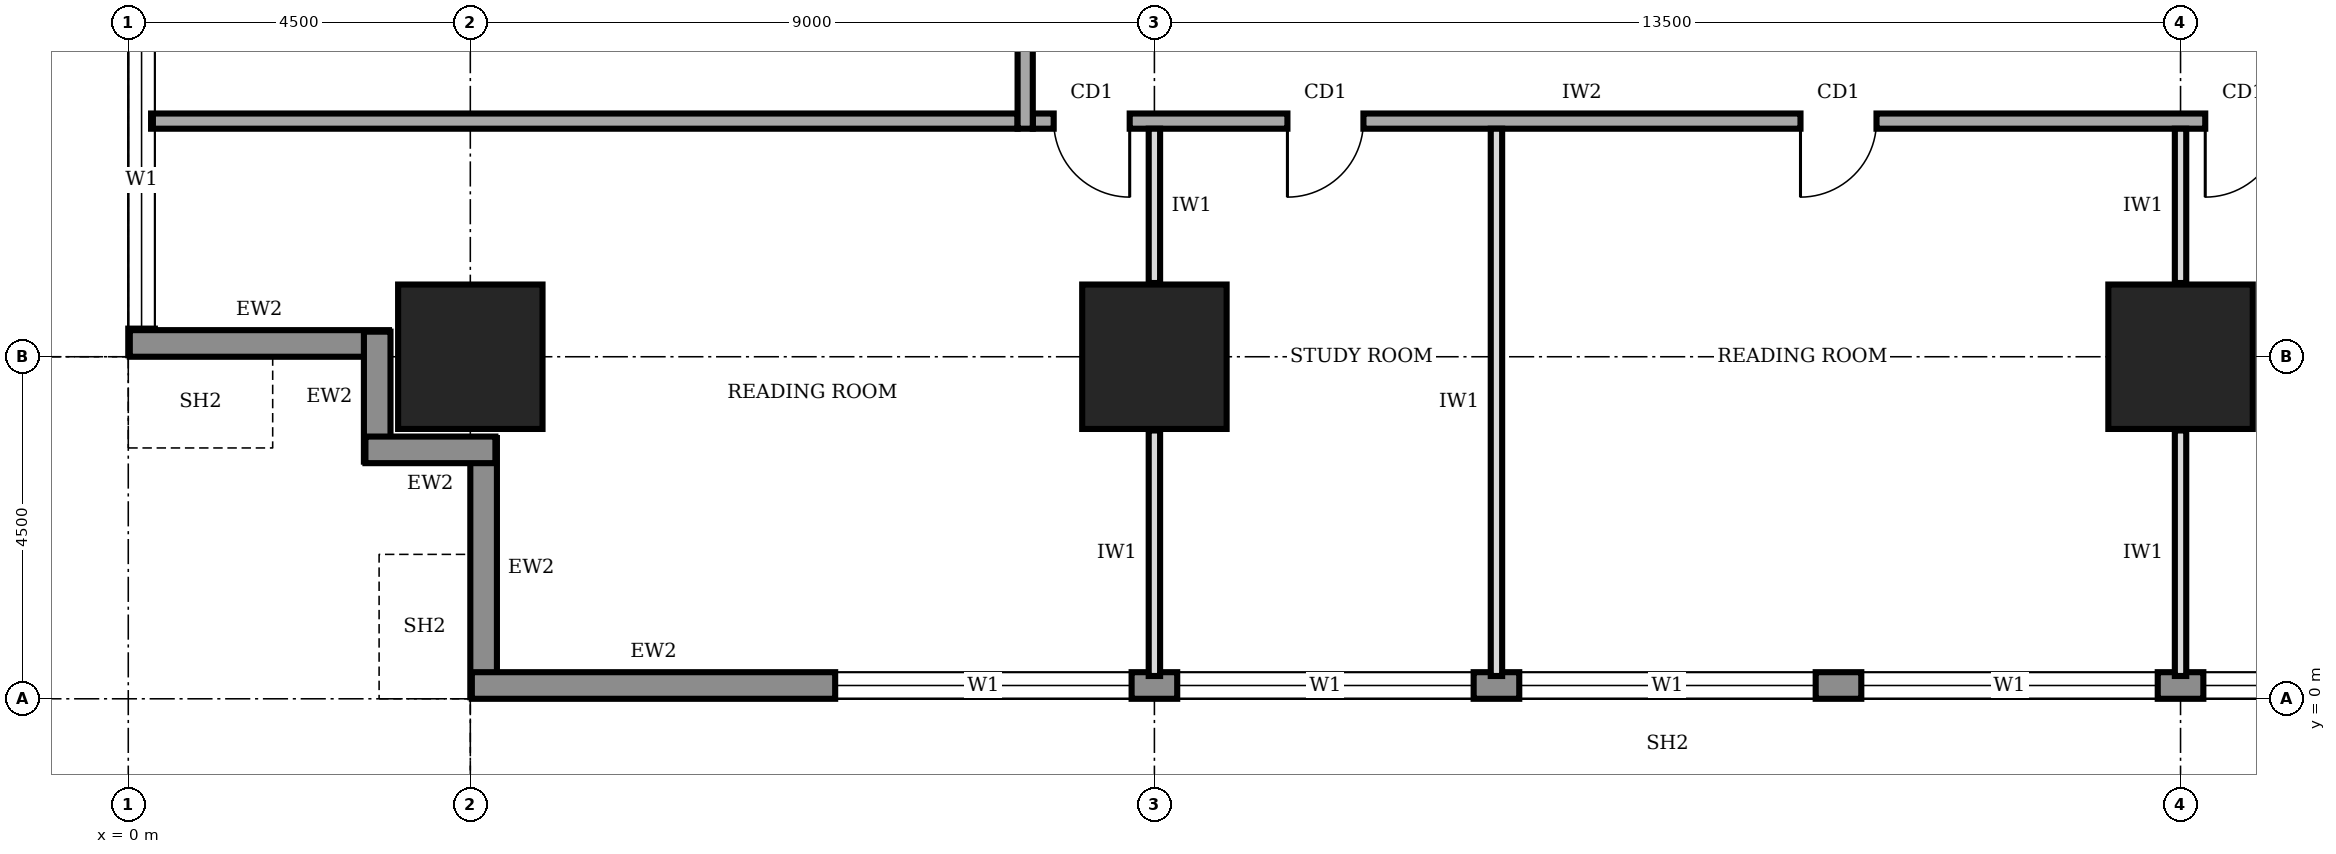
"""IFC4 building model, lengths in metres.
Left out: names, types, materials, properties, quantities, classifications, styles, units other than length and angle.
Written with IfcOpenShell. Run it as: python <this file> out.ifc"""

import sys

from ifc_helpers import new_model, si_unit, direction, frame, frame_2d, origin, origin_2d, place, context, subcontext, project, spatial, rectangle, extrude, element, fill, save


model = new_model("IFC4")
c1 = context("Model", 3, precision=1e-05, world=origin(), true_north=direction((0.0, 1.0)))
c2 = subcontext(c1, "Body", "Model", "MODEL_VIEW")
j1 = project(units=[si_unit("LENGTHUNIT", "METRE"), si_unit("PLANEANGLEUNIT", "RADIAN")], contexts=[c1])
p1 = place(None, origin())
s1 = spatial("IfcSite", under=j1, at=p1, CompositionType="ELEMENT")
p2 = place(p1, origin())
s2 = spatial("IfcBuilding", under=s1, at=p2, CompositionType="ELEMENT")
p3 = place(p2, frame((0.0, 0.0, 129.0)))
s3 = spatial("IfcBuildingStorey", under=s2, at=p3, CompositionType="ELEMENT", Elevation=129.0)
for number, where, z_axis, x_axis in (
    (1, (4.5, 4.5, 0.0), (0.0, 0.0, 1.0), (1.0, 0.0, 0.0)),
    (2, (13.5, 4.5, 0.0), (0.0, 0.0, 1.0), (1.0, 0.0, 0.0)),
    (3, (27.0, 4.5, 0.0), (0.0, 0.0, 1.0), (1.0, 0.0, 0.0)),
):
    element("IfcColumn", number, at=place(p3, frame(where, z_axis=z_axis, x_axis=x_axis)), inside=s3, PredefinedType="COLUMN", context=c2, shape_type="SweptSolid", body=[
        extrude(rectangle(XDim=1.9, YDim=1.9, at=origin_2d()), origin(), (0.0, 0.0, 1.0), 4.0),
    ])
p4 = place(p3, frame((4.675, 3.43, 0.0), z_axis=(0.0, 0.0, 1.0), x_axis=(0.0, -1.0, 0.0)))
e4 = element("IfcWall", 4, at=p4, inside=s3, PredefinedType="STANDARD", context=c2, shape_type="SweptSolid", body=[
    extrude(rectangle(XDim=3.41, YDim=0.35, at=frame_2d((1.705, 0.0))), origin(), (0.0, 0.0, 1.0), 2.85),
])
p5 = place(p3, frame((4.52, 0.175, 0.0), z_axis=(0.0, 0.0, 1.0), x_axis=(1.0, 0.0, 0.0)))
e5 = element("IfcWall", 5, at=p5, inside=s3, PredefinedType="STANDARD", context=c2, shape_type="SweptSolid", body=[
    extrude(rectangle(XDim=31.46, YDim=0.35, at=frame_2d((15.73, 0.0))), origin(), (0.0, 0.0, 1.0), 3.75),
])
p6 = place(p5, frame((4.78, 0.0, 0.9)))
e6 = element("IfcOpeningElement", 6, at=p6, cuts=e5, PredefinedType="OPENING", context=c2, shape_type="SweptSolid", body=[
    extrude(rectangle(XDim=3.9, YDim=2.2, at=frame_2d((1.95, 1.1))), frame((0.0, 0.185, 0.0), z_axis=(0.0, -1.0, 0.0), x_axis=(1.0, 0.0, 0.0)), (0.0, 0.0, 1.0), 0.37),
])
p7 = place(p5, frame((9.28, 0.0, 0.9)))
e7 = element("IfcOpeningElement", 7, at=p7, cuts=e5, PredefinedType="OPENING", context=c2, shape_type="SweptSolid", body=[
    extrude(rectangle(XDim=3.9, YDim=2.2, at=frame_2d((1.95, 1.1))), frame((0.0, 0.185, 0.0), z_axis=(0.0, -1.0, 0.0), x_axis=(1.0, 0.0, 0.0)), (0.0, 0.0, 1.0), 0.37),
])
p8 = place(p5, frame((13.78, 0.0, 0.9)))
e8 = element("IfcOpeningElement", 8, at=p8, cuts=e5, PredefinedType="OPENING", context=c2, shape_type="SweptSolid", body=[
    extrude(rectangle(XDim=3.9, YDim=2.2, at=frame_2d((1.95, 1.1))), frame((0.0, 0.185, 0.0), z_axis=(0.0, -1.0, 0.0), x_axis=(1.0, 0.0, 0.0)), (0.0, 0.0, 1.0), 0.37),
])
p9 = place(p5, frame((18.28, 0.0, 0.9)))
e9 = element("IfcOpeningElement", 9, at=p9, cuts=e5, PredefinedType="OPENING", context=c2, shape_type="SweptSolid", body=[
    extrude(rectangle(XDim=3.9, YDim=2.2, at=frame_2d((1.95, 1.1))), frame((0.0, 0.185, 0.0), z_axis=(0.0, -1.0, 0.0), x_axis=(1.0, 0.0, 0.0)), (0.0, 0.0, 1.0), 0.37),
])
p10 = place(p5, frame((22.78, 0.0, 0.9)))
e10 = element("IfcOpeningElement", 10, at=p10, cuts=e5, PredefinedType="OPENING", context=c2, shape_type="SweptSolid", body=[
    extrude(rectangle(XDim=3.9, YDim=2.2, at=frame_2d((1.95, 1.1))), frame((0.0, 0.185, 0.0), z_axis=(0.0, -1.0, 0.0), x_axis=(1.0, 0.0, 0.0)), (0.0, 0.0, 1.0), 0.37),
])
p11 = place(p5, frame((27.21, 0.0, 0.9)))
e11 = element("IfcOpeningElement", 11, at=p11, cuts=e5, PredefinedType="OPENING", context=c2, shape_type="SweptSolid", body=[
    extrude(rectangle(XDim=3.9, YDim=2.2, at=frame_2d((1.95, 1.1))), frame((0.0, 0.185, 0.0), z_axis=(0.0, -1.0, 0.0), x_axis=(1.0, 0.0, 0.0)), (0.0, 0.0, 1.0), 0.37),
])
p12 = place(p3, frame((0.175, 35.98, 0.0), z_axis=(0.0, 0.0, 1.0), x_axis=(0.0, -1.0, 0.0)))
e12 = element("IfcWall", 12, at=p12, inside=s3, PredefinedType="STANDARD", context=c2, shape_type="SweptSolid", body=[
    extrude(rectangle(XDim=31.46, YDim=0.35, at=frame_2d((15.73, 0.0))), origin(), (0.0, 0.0, 1.0), 3.75),
])
p13 = place(p12, frame((27.21, 0.0, 0.9)))
e13 = element("IfcOpeningElement", 13, at=p13, cuts=e12, PredefinedType="OPENING", context=c2, shape_type="SweptSolid", body=[
    extrude(rectangle(XDim=3.9, YDim=2.2, at=frame_2d((1.95, 1.1))), frame((0.0, 0.185, 0.0), z_axis=(0.0, -1.0, 0.0), x_axis=(1.0, 0.0, 0.0)), (0.0, 0.0, 1.0), 0.37),
])
p14 = place(p12, frame((22.78, 0.0, 0.9)))
e14 = element("IfcOpeningElement", 14, at=p14, cuts=e12, PredefinedType="OPENING", context=c2, shape_type="SweptSolid", body=[
    extrude(rectangle(XDim=3.9, YDim=2.2, at=frame_2d((1.95, 1.1))), frame((0.0, 0.185, 0.0), z_axis=(0.0, -1.0, 0.0), x_axis=(1.0, 0.0, 0.0)), (0.0, 0.0, 1.0), 0.37),
])
p15 = place(p12, frame((18.28, 0.0, 0.9)))
e15 = element("IfcOpeningElement", 15, at=p15, cuts=e12, PredefinedType="OPENING", context=c2, shape_type="SweptSolid", body=[
    extrude(rectangle(XDim=3.9, YDim=2.2, at=frame_2d((1.95, 1.1))), frame((0.0, 0.185, 0.0), z_axis=(0.0, -1.0, 0.0), x_axis=(1.0, 0.0, 0.0)), (0.0, 0.0, 1.0), 0.37),
])
p16 = place(p12, frame((13.78, 0.0, 0.9)))
e16 = element("IfcOpeningElement", 16, at=p16, cuts=e12, PredefinedType="OPENING", context=c2, shape_type="SweptSolid", body=[
    extrude(rectangle(XDim=3.9, YDim=2.2, at=frame_2d((1.95, 1.1))), frame((0.0, 0.185, 0.0), z_axis=(0.0, -1.0, 0.0), x_axis=(1.0, 0.0, 0.0)), (0.0, 0.0, 1.0), 0.37),
])
p17 = place(p12, frame((9.28, 0.0, 0.9)))
e17 = element("IfcOpeningElement", 17, at=p17, cuts=e12, PredefinedType="OPENING", context=c2, shape_type="SweptSolid", body=[
    extrude(rectangle(XDim=3.9, YDim=2.2, at=frame_2d((1.95, 1.1))), frame((0.0, 0.185, 0.0), z_axis=(0.0, -1.0, 0.0), x_axis=(1.0, 0.0, 0.0)), (0.0, 0.0, 1.0), 0.37),
])
p18 = place(p12, frame((4.78, 0.0, 0.9)))
e18 = element("IfcOpeningElement", 18, at=p18, cuts=e12, PredefinedType="OPENING", context=c2, shape_type="SweptSolid", body=[
    extrude(rectangle(XDim=3.9, YDim=2.2, at=frame_2d((1.95, 1.1))), frame((0.0, 0.185, 0.0), z_axis=(0.0, -1.0, 0.0), x_axis=(1.0, 0.0, 0.0)), (0.0, 0.0, 1.0), 0.37),
])
p19 = place(p3, frame((0.02, 4.675, 0.0), z_axis=(0.0, 0.0, 1.0), x_axis=(1.0, 0.0, 0.0)))
e19 = element("IfcWall", 19, at=p19, inside=s3, PredefinedType="STANDARD", context=c2, shape_type="SweptSolid", body=[
    extrude(rectangle(XDim=3.41, YDim=0.35, at=frame_2d((1.705, 0.0))), origin(), (0.0, 0.0, 1.0), 2.85),
])
for number, where, z_axis, x_axis in (
    (20, (3.275, 4.83, 0.0), (0.0, 0.0, 1.0), (0.0, -1.0, 0.0)),
    (21, (3.12, 3.275, 0.0), (0.0, 0.0, 1.0), (1.0, 0.0, 0.0)),
):
    element("IfcWall", number, at=place(p3, frame(where, z_axis=z_axis, x_axis=x_axis)), inside=s3, PredefinedType="STANDARD", context=c2, shape_type="SweptSolid", body=[
        extrude(rectangle(XDim=1.71, YDim=0.35, at=frame_2d((0.855, 0.0))), origin(), (0.0, 0.0, 1.0), 3.75),
    ])
p20 = place(p3, frame((11.9, 7.6, 0.0), z_axis=(0.0, 0.0, 1.0), x_axis=(1.0, 0.0, 0.0)))
e22 = element("IfcWall", 22, at=p20, inside=s3, PredefinedType="SOLIDWALL", context=c2, shape_type="SweptSolid", body=[
    extrude(rectangle(XDim=16.9, YDim=0.2, at=frame_2d((8.45, 0.0))), origin(), (0.0, 0.0, 1.0), 3.75),
])
p21 = place(p20, frame((0.275, 0.0, 0.0)))
e23 = element("IfcOpeningElement", 23, at=p21, cuts=e22, PredefinedType="OPENING", context=c2, shape_type="SweptSolid", body=[
    extrude(rectangle(XDim=1.0, YDim=2.1, at=frame_2d((0.5, 1.05))), frame((0.0, 0.11, 0.0), z_axis=(0.0, -1.0, 0.0), x_axis=(1.0, 0.0, 0.0)), (0.0, 0.0, 1.0), 0.22),
])
p22 = place(p20, frame((3.35, 0.0, 0.0)))
e24 = element("IfcOpeningElement", 24, at=p22, cuts=e22, PredefinedType="OPENING", context=c2, shape_type="SweptSolid", body=[
    extrude(rectangle(XDim=1.0, YDim=2.1, at=frame_2d((0.5, 1.05))), frame((0.0, 0.11, 0.0), z_axis=(0.0, -1.0, 0.0), x_axis=(1.0, 0.0, 0.0)), (0.0, 0.0, 1.0), 0.22),
])
p23 = place(p20, frame((10.1, 0.0, 0.0)))
e25 = element("IfcOpeningElement", 25, at=p23, cuts=e22, PredefinedType="OPENING", context=c2, shape_type="SweptSolid", body=[
    extrude(rectangle(XDim=1.0, YDim=2.1, at=frame_2d((0.5, 1.05))), frame((0.0, 0.11, 0.0), z_axis=(0.0, -1.0, 0.0), x_axis=(1.0, 0.0, 0.0)), (0.0, 0.0, 1.0), 0.22),
])
p24 = place(p20, frame((15.425, 0.0, 0.0)))
e26 = element("IfcOpeningElement", 26, at=p24, cuts=e22, PredefinedType="OPENING", context=c2, shape_type="SweptSolid", body=[
    extrude(rectangle(XDim=1.0, YDim=2.1, at=frame_2d((0.5, 1.05))), frame((0.0, 0.11, 0.0), z_axis=(0.0, -1.0, 0.0), x_axis=(1.0, 0.0, 0.0)), (0.0, 0.0, 1.0), 0.22),
])
p25 = place(p3, frame((11.8, 31.3, 0.0), z_axis=(0.0, 0.0, 1.0), x_axis=(0.0, -1.0, 0.0)))
e27 = element("IfcWall", 27, at=p25, inside=s3, PredefinedType="SOLIDWALL", context=c2, shape_type="SweptSolid", body=[
    extrude(rectangle(XDim=23.8, YDim=0.2, at=frame_2d((11.9, 0.0))), origin(), (0.0, 0.0, 1.0), 3.75),
])
p26 = place(p25, frame((20.3, 0.0, 0.0)))
e28 = element("IfcOpeningElement", 28, at=p26, cuts=e27, PredefinedType="OPENING", context=c2, shape_type="SweptSolid", body=[
    extrude(rectangle(XDim=1.0, YDim=2.1, at=frame_2d((0.5, 1.05))), frame((0.0, 0.11, 0.0), z_axis=(0.0, -1.0, 0.0), x_axis=(1.0, 0.0, 0.0)), (0.0, 0.0, 1.0), 0.22),
])
p27 = place(p25, frame((16.2, 0.0, 0.0)))
e29 = element("IfcOpeningElement", 29, at=p27, cuts=e27, PredefinedType="OPENING", context=c2, shape_type="SweptSolid", body=[
    extrude(rectangle(XDim=1.0, YDim=2.1, at=frame_2d((0.5, 1.05))), frame((0.0, 0.11, 0.0), z_axis=(0.0, -1.0, 0.0), x_axis=(1.0, 0.0, 0.0)), (0.0, 0.0, 1.0), 0.22),
])
p28 = place(p25, frame((13.2, 0.0, 0.0)))
e30 = element("IfcOpeningElement", 30, at=p28, cuts=e27, PredefinedType="OPENING", context=c2, shape_type="SweptSolid", body=[
    extrude(rectangle(XDim=0.9, YDim=2.1, at=frame_2d((0.45, 1.05))), frame((0.0, 0.11, 0.0), z_axis=(0.0, -1.0, 0.0), x_axis=(1.0, 0.0, 0.0)), (0.0, 0.0, 1.0), 0.22),
])
p29 = place(p25, frame((10.15, 0.0, 0.0)))
e31 = element("IfcOpeningElement", 31, at=p29, cuts=e27, PredefinedType="OPENING", context=c2, shape_type="SweptSolid", body=[
    extrude(rectangle(XDim=0.9, YDim=2.1, at=frame_2d((0.45, 1.05))), frame((0.0, 0.11, 0.0), z_axis=(0.0, -1.0, 0.0), x_axis=(1.0, 0.0, 0.0)), (0.0, 0.0, 1.0), 0.22),
])
p30 = place(p25, frame((5.45, 0.0, 0.0)))
e32 = element("IfcOpeningElement", 32, at=p30, cuts=e27, PredefinedType="OPENING", context=c2, shape_type="SweptSolid", body=[
    extrude(rectangle(XDim=0.9, YDim=2.1, at=frame_2d((0.45, 1.05))), frame((0.0, 0.11, 0.0), z_axis=(0.0, -1.0, 0.0), x_axis=(1.0, 0.0, 0.0)), (0.0, 0.0, 1.0), 0.22),
])
p31 = place(p25, frame((8.0, 0.0, 0.0)))
e33 = element("IfcOpeningElement", 33, at=p31, cuts=e27, PredefinedType="OPENING", context=c2, shape_type="SweptSolid", body=[
    extrude(rectangle(XDim=1.0, YDim=2.1, at=frame_2d((0.5, 1.05))), frame((0.0, 0.11, 0.0), z_axis=(0.0, -1.0, 0.0), x_axis=(1.0, 0.0, 0.0)), (0.0, 0.0, 1.0), 0.22),
])
p32 = place(p25, frame((1.55, 0.0, 0.0)))
e34 = element("IfcOpeningElement", 34, at=p32, cuts=e27, PredefinedType="OPENING", context=c2, shape_type="SweptSolid", body=[
    extrude(rectangle(XDim=1.0, YDim=2.1, at=frame_2d((0.5, 1.05))), frame((0.0, 0.11, 0.0), z_axis=(0.0, -1.0, 0.0), x_axis=(1.0, 0.0, 0.0)), (0.0, 0.0, 1.0), 0.22),
])
p33 = place(p3, frame((0.3, 7.6, 0.0), z_axis=(0.0, 0.0, 1.0), x_axis=(1.0, 0.0, 0.0)))
e35 = element("IfcWall", 35, at=p33, inside=s3, PredefinedType="SOLIDWALL", context=c2, shape_type="SweptSolid", body=[
    extrude(rectangle(XDim=11.4, YDim=0.2, at=frame_2d((5.7, 0.0))), origin(), (0.0, 0.0, 1.0), 3.75),
])
p34 = place(p3, frame((13.5, 0.3, 0.0), z_axis=(0.0, 0.0, 1.0), x_axis=(0.0, 1.0, 0.0)))
e36 = element("IfcWall", 36, at=p34, inside=s3, PredefinedType="PARTITIONING", context=c2, shape_type="SweptSolid", body=[
    extrude(rectangle(XDim=3.23, YDim=0.15, at=frame_2d((1.615, 0.0))), origin(), (0.0, 0.0, 1.0), 2.85),
])
p35 = place(p3, frame((13.5, 5.47, 0.0), z_axis=(0.0, 0.0, 1.0), x_axis=(0.0, 1.0, 0.0)))
e37 = element("IfcWall", 37, at=p35, inside=s3, PredefinedType="PARTITIONING", context=c2, shape_type="SweptSolid", body=[
    extrude(rectangle(XDim=2.03, YDim=0.15, at=frame_2d((1.015, 0.0))), origin(), (0.0, 0.0, 1.0), 2.85),
])
p36 = place(p3, frame((18.0, 0.3, 0.0), z_axis=(0.0, 0.0, 1.0), x_axis=(0.0, 1.0, 0.0)))
e38 = element("IfcWall", 38, at=p36, inside=s3, PredefinedType="PARTITIONING", context=c2, shape_type="SweptSolid", body=[
    extrude(rectangle(XDim=7.2, YDim=0.15, at=frame_2d((3.6, 0.0))), origin(), (0.0, 0.0, 1.0), 3.75),
])
p37 = place(p3, frame((27.0, 0.3, 0.0), z_axis=(0.0, 0.0, 1.0), x_axis=(0.0, 1.0, 0.0)))
e39 = element("IfcWall", 39, at=p37, inside=s3, PredefinedType="PARTITIONING", context=c2, shape_type="SweptSolid", body=[
    extrude(rectangle(XDim=3.23, YDim=0.15, at=frame_2d((1.615, 0.0))), origin(), (0.0, 0.0, 1.0), 2.85),
])
p38 = place(p3, frame((27.0, 5.47, 0.0), z_axis=(0.0, 0.0, 1.0), x_axis=(0.0, 1.0, 0.0)))
e40 = element("IfcWall", 40, at=p38, inside=s3, PredefinedType="PARTITIONING", context=c2, shape_type="SweptSolid", body=[
    extrude(rectangle(XDim=2.03, YDim=0.15, at=frame_2d((1.015, 0.0))), origin(), (0.0, 0.0, 1.0), 2.85),
])
p39 = place(p6, origin())
e41 = element("IfcWindow", 41, at=p39, inside=s3, PartitioningType="SINGLE_PANEL", PredefinedType="WINDOW", context=c2, shape_type="SweptSolid", body=[
    extrude(rectangle(XDim=3.9, YDim=2.2, at=frame_2d((1.95, 1.1))), frame((0.0, 0.03, 0.0), z_axis=(0.0, -1.0, 0.0), x_axis=(1.0, 0.0, 0.0)), (0.0, 0.0, 1.0), 0.06),
])
fill(e6, e41)
p40 = place(p7, origin())
e42 = element("IfcWindow", 42, at=p40, inside=s3, PartitioningType="SINGLE_PANEL", PredefinedType="WINDOW", context=c2, shape_type="SweptSolid", body=[
    extrude(rectangle(XDim=3.9, YDim=2.2, at=frame_2d((1.95, 1.1))), frame((0.0, 0.03, 0.0), z_axis=(0.0, -1.0, 0.0), x_axis=(1.0, 0.0, 0.0)), (0.0, 0.0, 1.0), 0.06),
])
fill(e7, e42)
p41 = place(p8, origin())
e43 = element("IfcWindow", 43, at=p41, inside=s3, PartitioningType="SINGLE_PANEL", PredefinedType="WINDOW", context=c2, shape_type="SweptSolid", body=[
    extrude(rectangle(XDim=3.9, YDim=2.2, at=frame_2d((1.95, 1.1))), frame((0.0, 0.03, 0.0), z_axis=(0.0, -1.0, 0.0), x_axis=(1.0, 0.0, 0.0)), (0.0, 0.0, 1.0), 0.06),
])
fill(e8, e43)
p42 = place(p9, origin())
e44 = element("IfcWindow", 44, at=p42, inside=s3, PartitioningType="SINGLE_PANEL", PredefinedType="WINDOW", context=c2, shape_type="SweptSolid", body=[
    extrude(rectangle(XDim=3.9, YDim=2.2, at=frame_2d((1.95, 1.1))), frame((0.0, 0.03, 0.0), z_axis=(0.0, -1.0, 0.0), x_axis=(1.0, 0.0, 0.0)), (0.0, 0.0, 1.0), 0.06),
])
fill(e9, e44)
p43 = place(p10, origin())
e45 = element("IfcWindow", 45, at=p43, inside=s3, PartitioningType="SINGLE_PANEL", PredefinedType="WINDOW", context=c2, shape_type="SweptSolid", body=[
    extrude(rectangle(XDim=3.9, YDim=2.2, at=frame_2d((1.95, 1.1))), frame((0.0, 0.03, 0.0), z_axis=(0.0, -1.0, 0.0), x_axis=(1.0, 0.0, 0.0)), (0.0, 0.0, 1.0), 0.06),
])
fill(e10, e45)
p44 = place(p13, origin())
e46 = element("IfcWindow", 46, at=p44, inside=s3, PartitioningType="SINGLE_PANEL", PredefinedType="WINDOW", context=c2, shape_type="SweptSolid", body=[
    extrude(rectangle(XDim=3.9, YDim=2.2, at=frame_2d((1.95, 1.1))), frame((0.0, 0.03, 0.0), z_axis=(0.0, -1.0, 0.0), x_axis=(1.0, 0.0, 0.0)), (0.0, 0.0, 1.0), 0.06),
])
fill(e13, e46)
p45 = place(p21, frame((1.0, 0.0, 0.0), z_axis=(0.0, 0.0, 1.0), x_axis=(-1.0, 0.0, 0.0)))
e47 = element("IfcDoor", 47, at=p45, inside=s3, OperationType="SINGLE_SWING_LEFT", PredefinedType="DOOR", context=c2, shape_type="SweptSolid", body=[
    extrude(rectangle(XDim=1.0, YDim=2.1, at=frame_2d((0.5, 1.05))), frame((0.0, 0.025, 0.0), z_axis=(0.0, -1.0, 0.0), x_axis=(1.0, 0.0, 0.0)), (0.0, 0.0, 1.0), 0.05),
])
fill(e23, e47)
p46 = place(p22, frame((1.0, 0.0, 0.0), z_axis=(0.0, 0.0, 1.0), x_axis=(-1.0, 0.0, 0.0)))
e48 = element("IfcDoor", 48, at=p46, inside=s3, OperationType="SINGLE_SWING_RIGHT", PredefinedType="DOOR", context=c2, shape_type="SweptSolid", body=[
    extrude(rectangle(XDim=1.0, YDim=2.1, at=frame_2d((0.5, 1.05))), frame((0.0, 0.025, 0.0), z_axis=(0.0, -1.0, 0.0), x_axis=(1.0, 0.0, 0.0)), (0.0, 0.0, 1.0), 0.05),
])
fill(e24, e48)
p47 = place(p23, frame((1.0, 0.0, 0.0), z_axis=(0.0, 0.0, 1.0), x_axis=(-1.0, 0.0, 0.0)))
e49 = element("IfcDoor", 49, at=p47, inside=s3, OperationType="SINGLE_SWING_RIGHT", PredefinedType="DOOR", context=c2, shape_type="SweptSolid", body=[
    extrude(rectangle(XDim=1.0, YDim=2.1, at=frame_2d((0.5, 1.05))), frame((0.0, 0.025, 0.0), z_axis=(0.0, -1.0, 0.0), x_axis=(1.0, 0.0, 0.0)), (0.0, 0.0, 1.0), 0.05),
])
fill(e25, e49)
p48 = place(p24, frame((1.0, 0.0, 0.0), z_axis=(0.0, 0.0, 1.0), x_axis=(-1.0, 0.0, 0.0)))
e50 = element("IfcDoor", 50, at=p48, inside=s3, OperationType="SINGLE_SWING_RIGHT", PredefinedType="DOOR", context=c2, shape_type="SweptSolid", body=[
    extrude(rectangle(XDim=1.0, YDim=2.1, at=frame_2d((0.5, 1.05))), frame((0.0, 0.025, 0.0), z_axis=(0.0, -1.0, 0.0), x_axis=(1.0, 0.0, 0.0)), (0.0, 0.0, 1.0), 0.05),
])
fill(e26, e50)
save(model, sys.argv[1])
